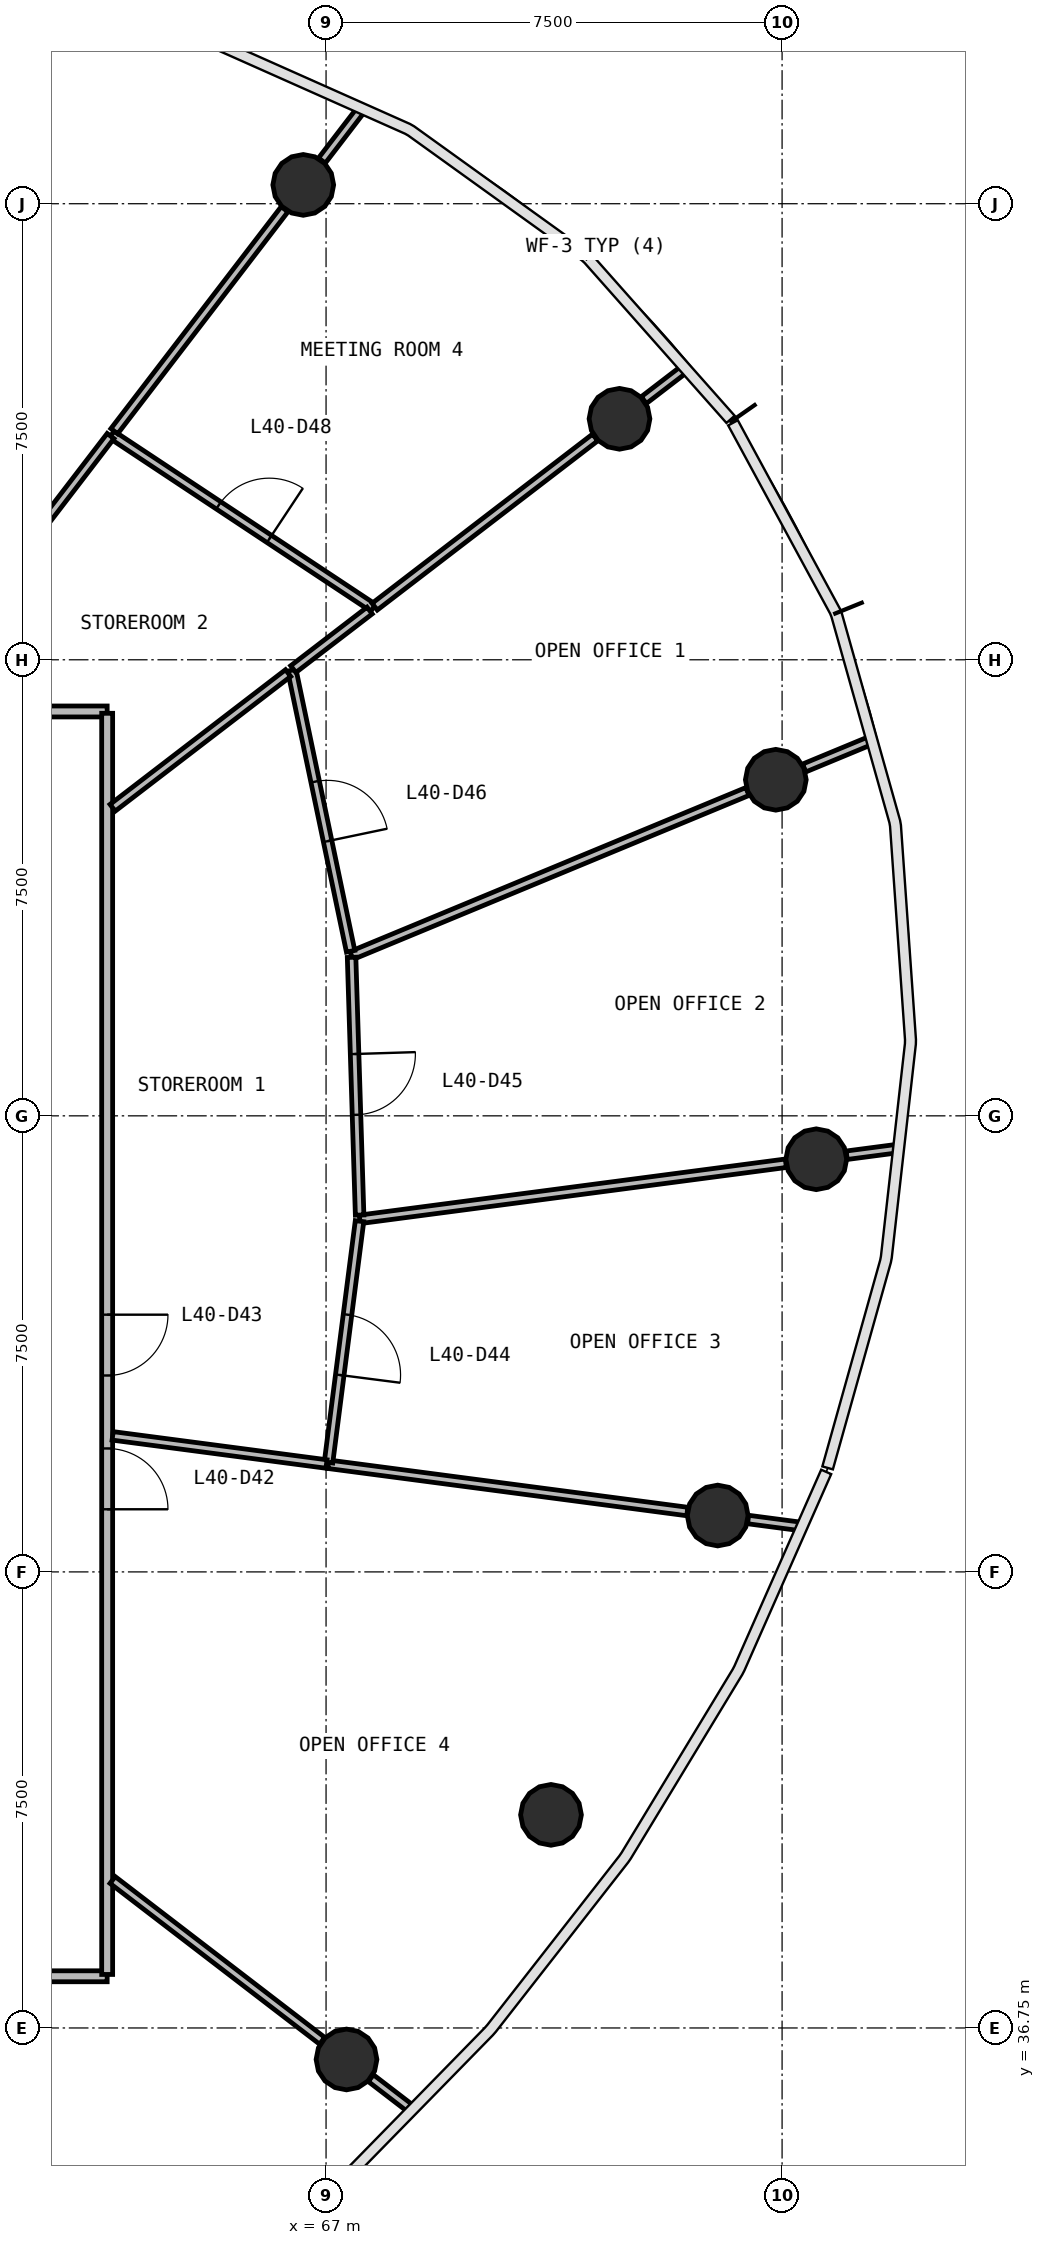
"""IFC4 building model, lengths in metres.
Left out: names, types, materials, properties, quantities, classifications, styles, units other than length and angle.
Written with IfcOpenShell. Run it as: python <this file> out.ifc"""

import sys

from ifc_helpers import new_model, si_unit, direction, frame, frame_2d, origin, origin_2d, place, context, subcontext, project, spatial, rectangle, circle, extrude, source, transform, mapped, element, fill, save


model = new_model("IFC4")
c1 = context("Model", 3, precision=1e-05, world=origin(), true_north=direction((0.0, 1.0)))
c2 = subcontext(c1, "Body", "Model", "MODEL_VIEW")
j1 = project(units=[si_unit("LENGTHUNIT", "METRE"), si_unit("PLANEANGLEUNIT", "RADIAN")], contexts=[c1])
p1 = place(None, origin())
s1 = spatial("IfcSite", under=j1, at=p1, CompositionType="ELEMENT")
p2 = place(p1, origin())
s2 = spatial("IfcBuilding", under=s1, at=p2, CompositionType="ELEMENT")
p3 = place(p2, frame((0.0, 0.0, 168.2)))
s3 = spatial("IfcBuildingStorey", under=s2, at=p3, CompositionType="ELEMENT", Elevation=168.2)
m1 = source(origin(), c2, "Body", "SweptSolid", [
    extrude(circle(Radius=0.5, at=origin_2d()), origin(), (0.0, 0.0, 1.0), 3.9),
])
for number, where, z_axis, x_axis in (
    (1, (75.062, 51.036, 0.0), (0.0, 0.0, 1.0), (1.0, 0.0, 0.0)),
    (2, (74.397, 57.277, 0.0), (0.0, 0.0, 1.0), (1.0, 0.0, 0.0)),
    (3, (71.826, 63.213, 0.0), (0.0, 0.0, 1.0), (1.0, 0.0, 0.0)),
    (4, (66.625, 67.06, 0.0), (0.0, 0.0, 1.0), (1.0, 0.0, 0.0)),
    (5, (67.336, 36.232, 0.0), (0.0, 0.0, 1.0), (1.0, 0.0, 0.0)),
    (6, (70.699, 40.254, 0.0), (0.0, 0.0, 1.0), (1.0, 0.0, 0.0)),
    (7, (73.441, 45.177, 0.0), (0.0, 0.0, 1.0), (1.0, 0.0, 0.0)),
):
    element("IfcColumn", number, at=place(p3, frame(where, z_axis=z_axis, x_axis=x_axis)), inside=s3, PredefinedType="COLUMN", context=c2, shape_type="MappedRepresentation", body=[
        mapped(m1, transform((0.0, 0.0, 0.0), scale=1.0)),
    ])
p4 = place(p3, frame((40.6, 58.4, 0.0), z_axis=(0.0, 0.0, 1.0), x_axis=(1.0, 0.0, 0.0)))
e8 = element("IfcWall", 8, at=p4, inside=s3, PredefinedType="PARTITIONING", context=c2, shape_type="SweptSolid", body=[
    extrude(rectangle(XDim=22.8, YDim=0.18, at=frame_2d((11.4, 0.0))), origin(), (0.0, 0.0, 1.0), 2.88),
])
p5 = place(p4, frame((16.05, 0.0, 0.0)))
e9 = element("IfcOpeningElement", 9, at=p5, cuts=e8, PredefinedType="OPENING", context=c2, shape_type="SweptSolid", body=[
    extrude(rectangle(XDim=0.9, YDim=2.1, at=frame_2d((0.45, 1.05))), frame((0.0, 0.1, 0.0), z_axis=(0.0, -1.0, 0.0), x_axis=(1.0, 0.0, 0.0)), (0.0, 0.0, 1.0), 0.2),
])
p6 = place(p4, frame((13.05, 0.0, 0.0)))
e10 = element("IfcOpeningElement", 10, at=p6, cuts=e8, PredefinedType="OPENING", context=c2, shape_type="SweptSolid", body=[
    extrude(rectangle(XDim=0.9, YDim=2.1, at=frame_2d((0.45, 1.05))), frame((0.0, 0.1, 0.0), z_axis=(0.0, -1.0, 0.0), x_axis=(1.0, 0.0, 0.0)), (0.0, 0.0, 1.0), 0.2),
])
p7 = place(p4, frame((10.95, 0.0, 0.0)))
e11 = element("IfcOpeningElement", 11, at=p7, cuts=e8, PredefinedType="OPENING", context=c2, shape_type="SweptSolid", body=[
    extrude(rectangle(XDim=1.0, YDim=2.1, at=frame_2d((0.5, 1.05))), frame((0.0, 0.1, 0.0), z_axis=(0.0, -1.0, 0.0), x_axis=(1.0, 0.0, 0.0)), (0.0, 0.0, 1.0), 0.2),
])
p8 = place(p4, frame((19.95, 0.0, 0.0)))
e12 = element("IfcOpeningElement", 12, at=p8, cuts=e8, PredefinedType="OPENING", context=c2, shape_type="SweptSolid", body=[
    extrude(rectangle(XDim=1.0, YDim=2.1, at=frame_2d((0.5, 1.05))), frame((0.0, 0.1, 0.0), z_axis=(0.0, -1.0, 0.0), x_axis=(1.0, 0.0, 0.0)), (0.0, 0.0, 1.0), 0.2),
])
p9 = place(p3, frame((63.4, 37.6, 0.0), z_axis=(0.0, 0.0, 1.0), x_axis=(-1.0, 0.0, 0.0)))
e13 = element("IfcWall", 13, at=p9, inside=s3, PredefinedType="PARTITIONING", context=c2, shape_type="SweptSolid", body=[
    extrude(rectangle(XDim=22.8, YDim=0.18, at=frame_2d((11.4, 0.0))), origin(), (0.0, 0.0, 1.0), 2.88),
])
p10 = place(p9, frame((12.95, 0.0, 0.0)))
e14 = element("IfcOpeningElement", 14, at=p10, cuts=e13, PredefinedType="OPENING", context=c2, shape_type="SweptSolid", body=[
    extrude(rectangle(XDim=1.0, YDim=2.1, at=frame_2d((0.5, 1.05))), frame((0.0, 0.1, 0.0), z_axis=(0.0, -1.0, 0.0), x_axis=(1.0, 0.0, 0.0)), (0.0, 0.0, 1.0), 0.2),
])
p11 = place(p9, frame((10.95, 0.0, 0.0)))
e15 = element("IfcOpeningElement", 15, at=p11, cuts=e13, PredefinedType="OPENING", context=c2, shape_type="SweptSolid", body=[
    extrude(rectangle(XDim=1.0, YDim=2.1, at=frame_2d((0.5, 1.05))), frame((0.0, 0.1, 0.0), z_axis=(0.0, -1.0, 0.0), x_axis=(1.0, 0.0, 0.0)), (0.0, 0.0, 1.0), 0.2),
])
p12 = place(p9, frame((5.75, 0.0, 0.0)))
e16 = element("IfcOpeningElement", 16, at=p12, cuts=e13, PredefinedType="OPENING", context=c2, shape_type="SweptSolid", body=[
    extrude(rectangle(XDim=1.0, YDim=2.1, at=frame_2d((0.5, 1.05))), frame((0.0, 0.1, 0.0), z_axis=(0.0, -1.0, 0.0), x_axis=(1.0, 0.0, 0.0)), (0.0, 0.0, 1.0), 0.2),
])
p13 = place(p3, frame((63.4, 58.37, 0.0), z_axis=(0.0, 0.0, 1.0), x_axis=(0.0, -1.0, 0.0)))
e17 = element("IfcWall", 17, at=p13, inside=s3, PredefinedType="PARTITIONING", context=c2, shape_type="SweptSolid", body=[
    extrude(rectangle(XDim=20.74, YDim=0.18, at=frame_2d((10.37, 0.0))), origin(), (0.0, 0.0, 1.0), 2.88),
])
p14 = place(p13, frame((12.09, 0.0, 0.0)))
e18 = element("IfcOpeningElement", 18, at=p14, cuts=e17, PredefinedType="OPENING", context=c2, shape_type="SweptSolid", body=[
    extrude(rectangle(XDim=1.0, YDim=2.1, at=frame_2d((0.5, 1.05))), frame((0.0, 0.1, 0.0), z_axis=(0.0, -1.0, 0.0), x_axis=(1.0, 0.0, 0.0)), (0.0, 0.0, 1.0), 0.2),
])
p15 = place(p13, frame((9.89, 0.0, 0.0)))
e19 = element("IfcOpeningElement", 19, at=p15, cuts=e17, PredefinedType="OPENING", context=c2, shape_type="SweptSolid", body=[
    extrude(rectangle(XDim=1.0, YDim=2.1, at=frame_2d((0.5, 1.05))), frame((0.0, 0.1, 0.0), z_axis=(0.0, -1.0, 0.0), x_axis=(1.0, 0.0, 0.0)), (0.0, 0.0, 1.0), 0.2),
])
p16 = place(p3, frame((67.554, 50.048, 0.0), z_axis=(0.0, 0.0, 1.0), x_axis=(0.99144465259, 0.130527778084, 0.0)))
e20 = element("IfcWall", 20, at=p16, inside=s3, PredefinedType="PARTITIONING", context=c2, shape_type="SweptSolid", body=[
    extrude(rectangle(XDim=7.068, YDim=0.14, at=frame_2d((3.534, 0.0))), origin(), (0.0, 0.0, 1.0), 2.88),
])
p17 = place(p3, frame((67.419, 54.387, 0.0), z_axis=(0.0, 0.0, 1.0), x_axis=(0.923885532531, 0.382668946716, 0.0)))
e21 = element("IfcWall", 21, at=p17, inside=s3, PredefinedType="PARTITIONING", context=c2, shape_type="SweptSolid", body=[
    extrude(rectangle(XDim=7.048, YDim=0.14, at=frame_2d((3.524, 0.0))), origin(), (0.0, 0.0, 1.0), 2.88),
])
p18 = place(p3, frame((67.037, 46.021, 0.0), z_axis=(0.0, 0.0, 1.0), x_axis=(0.991443547419, -0.13053617231, 0.0)))
e22 = element("IfcWall", 22, at=p18, inside=s3, PredefinedType="PARTITIONING", context=c2, shape_type="SweptSolid", body=[
    extrude(rectangle(XDim=5.955, YDim=0.14, at=frame_2d((2.978, 0.0))), origin(), (0.0, 0.0, 1.0), 2.88),
])
p19 = place(p3, frame((63.474, 62.954, 0.0), z_axis=(0.0, 0.0, 1.0), x_axis=(0.833735501744, -0.552164027379, 0.0)))
e23 = element("IfcWall", 23, at=p19, inside=s3, PredefinedType="PARTITIONING", context=c2, shape_type="SweptSolid", body=[
    extrude(rectangle(XDim=5.159, YDim=0.14, at=frame_2d((2.58, 0.0))), origin(), (0.0, 0.0, 1.0), 2.88),
])
p20 = place(p19, frame((2.109, 0.0, 0.0)))
e24 = element("IfcOpeningElement", 24, at=p20, cuts=e23, PredefinedType="OPENING", context=c2, shape_type="SweptSolid", body=[
    extrude(rectangle(XDim=1.0, YDim=2.1, at=frame_2d((0.5, 1.05))), frame((0.0, 0.08, 0.0), z_axis=(0.0, -1.0, 0.0), x_axis=(1.0, 0.0, 0.0)), (0.0, 0.0, 1.0), 0.16),
])
p21 = place(p3, frame((66.437, 59.078, 0.0), z_axis=(0.0, 0.0, 1.0), x_axis=(0.20474910854, -0.978814488324, 0.0)))
e25 = element("IfcWall", 25, at=p21, inside=s3, PredefinedType="PARTITIONING", context=c2, shape_type="SweptSolid", body=[
    extrude(rectangle(XDim=4.722, YDim=0.14, at=frame_2d((2.361, 0.0))), origin(), (0.0, 0.0, 1.0), 2.88),
])
p22 = place(p21, frame((1.872, 0.0, 0.0)))
e26 = element("IfcOpeningElement", 26, at=p22, cuts=e25, PredefinedType="OPENING", context=c2, shape_type="SweptSolid", body=[
    extrude(rectangle(XDim=1.0, YDim=2.1, at=frame_2d((0.5, 1.05))), frame((0.0, 0.08, 0.0), z_axis=(0.0, -1.0, 0.0), x_axis=(1.0, 0.0, 0.0)), (0.0, 0.0, 1.0), 0.16),
])
p23 = place(p3, frame((63.517, 63.009, 0.0), z_axis=(0.0, 0.0, 1.0), x_axis=(0.608776844193, 0.793341511566, 0.0)))
e27 = element("IfcWall", 27, at=p23, inside=s3, PredefinedType="PARTITIONING", context=c2, shape_type="SweptSolid", body=[
    extrude(rectangle(XDim=4.601, YDim=0.14, at=frame_2d((2.3, 0.0))), origin(), (0.0, 0.0, 1.0), 2.88),
])
p24 = place(p3, frame((67.799, 60.123, 0.0), z_axis=(0.0, 0.0, 1.0), x_axis=(0.793350117956, 0.608765628414, 0.0)))
e28 = element("IfcWall", 28, at=p24, inside=s3, PredefinedType="PARTITIONING", context=c2, shape_type="SweptSolid", body=[
    extrude(rectangle(XDim=4.571, YDim=0.14, at=frame_2d((2.286, 0.0))), origin(), (0.0, 0.0, 1.0), 2.88),
])
p25 = place(p3, frame((63.49, 39.183, 0.0), z_axis=(0.0, 0.0, 1.0), x_axis=(0.793348465904, -0.608767781382, 0.0)))
e29 = element("IfcWall", 29, at=p25, inside=s3, PredefinedType="PARTITIONING", context=c2, shape_type="SweptSolid", body=[
    extrude(rectangle(XDim=4.344, YDim=0.14, at=frame_2d((2.172, 0.0))), origin(), (0.0, 0.0, 1.0), 2.88),
])
p26 = place(p3, frame((67.42, 54.357, 0.0), z_axis=(0.0, 0.0, 1.0), x_axis=(0.031204196908, -0.999513030478, 0.0)))
e30 = element("IfcWall", 30, at=p26, inside=s3, PredefinedType="PARTITIONING", context=c2, shape_type="SweptSolid", body=[
    extrude(rectangle(XDim=4.24, YDim=0.14, at=frame_2d((2.12, 0.0))), origin(), (0.0, 0.0, 1.0), 2.88),
])
p27 = place(p26, frame((1.591, 0.0, 0.0)))
e31 = element("IfcOpeningElement", 31, at=p27, cuts=e30, PredefinedType="OPENING", context=c2, shape_type="SweptSolid", body=[
    extrude(rectangle(XDim=1.0, YDim=2.1, at=frame_2d((0.5, 1.05))), frame((0.0, 0.08, 0.0), z_axis=(0.0, -1.0, 0.0), x_axis=(1.0, 0.0, 0.0)), (0.0, 0.0, 1.0), 0.16),
])
p28 = place(p3, frame((67.55, 50.018, 0.0), z_axis=(0.0, 0.0, 1.0), x_axis=(-0.127361365248, -0.991856382065, 0.0)))
e32 = element("IfcWall", 32, at=p28, inside=s3, PredefinedType="PARTITIONING", context=c2, shape_type="SweptSolid", body=[
    extrude(rectangle(XDim=4.0, YDim=0.14, at=frame_2d((2.0, 0.0))), origin(), (0.0, 0.0, 1.0), 2.88),
])
p29 = place(p28, frame((1.551, 0.0, 0.0)))
e33 = element("IfcOpeningElement", 33, at=p29, cuts=e32, PredefinedType="OPENING", context=c2, shape_type="SweptSolid", body=[
    extrude(rectangle(XDim=1.0, YDim=2.1, at=frame_2d((0.5, 1.05))), frame((0.0, 0.08, 0.0), z_axis=(0.0, -1.0, 0.0), x_axis=(1.0, 0.0, 0.0)), (0.0, 0.0, 1.0), 0.16),
])
p30 = place(p3, frame((63.49, 56.817, 0.0), z_axis=(0.0, 0.0, 1.0), x_axis=(0.79334701906, 0.60876966691, 0.0)))
e34 = element("IfcWall", 34, at=p30, inside=s3, PredefinedType="PARTITIONING", context=c2, shape_type="SweptSolid", body=[
    extrude(rectangle(XDim=3.637, YDim=0.14, at=frame_2d((1.819, 0.0))), origin(), (0.0, 0.0, 1.0), 2.88),
])
p31 = place(p3, frame((63.49, 46.487, 0.0), z_axis=(0.0, 0.0, 1.0), x_axis=(0.991450078563, -0.130486557612, 0.0)))
e35 = element("IfcWall", 35, at=p31, inside=s3, PredefinedType="PARTITIONING", context=c2, shape_type="SweptSolid", body=[
    extrude(rectangle(XDim=3.547, YDim=0.14, at=frame_2d((1.774, 0.0))), origin(), (0.0, 0.0, 1.0), 2.88),
])
p32 = place(p3, frame((61.969, 60.992, 0.0), z_axis=(0.0, 0.0, 1.0), x_axis=(0.608807082058, 0.793318307387, 0.0)))
e36 = element("IfcWall", 36, at=p32, inside=s3, PredefinedType="PARTITIONING", context=c2, shape_type="SweptSolid", body=[
    extrude(rectangle(XDim=2.443, YDim=0.14, at=frame_2d((1.221, 0.0))), origin(), (0.0, 0.0, 1.0), 2.88),
])
p33 = place(p3, frame((66.461, 59.096, 0.0), z_axis=(0.0, 0.0, 1.0), x_axis=(0.793380361994, 0.608726212022, 0.0)))
e37 = element("IfcWall", 37, at=p33, inside=s3, PredefinedType="PARTITIONING", context=c2, shape_type="SweptSolid", body=[
    extrude(rectangle(XDim=1.583, YDim=0.14, at=frame_2d((0.791, 0.0))), origin(), (0.0, 0.0, 1.0), 2.88),
])
p34 = place(p3, frame((74.863, 57.47, 0.0), z_axis=(0.0, 0.0, 1.0), x_axis=(0.923891330959, 0.382654947151, 0.0)))
e38 = element("IfcWall", 38, at=p34, inside=s3, PredefinedType="PARTITIONING", context=c2, shape_type="SweptSolid", body=[
    extrude(rectangle(XDim=1.186, YDim=0.14, at=frame_2d((0.593, 0.0))), origin(), (0.0, 0.0, 1.0), 2.88),
])
p35 = place(p3, frame((66.932, 67.46, 0.0), z_axis=(0.0, 0.0, 1.0), x_axis=(0.608863825282, 0.793274758367, 0.0)))
e39 = element("IfcWall", 39, at=p35, inside=s3, PredefinedType="PARTITIONING", context=c2, shape_type="SweptSolid", body=[
    extrude(rectangle(XDim=1.031, YDim=0.14, at=frame_2d((0.516, 0.0))), origin(), (0.0, 0.0, 1.0), 2.88),
])
p36 = place(p3, frame((72.226, 63.52, 0.0), z_axis=(0.0, 0.0, 1.0), x_axis=(0.793315863556, 0.608810266529, 0.0)))
e40 = element("IfcWall", 40, at=p36, inside=s3, PredefinedType="PARTITIONING", context=c2, shape_type="SweptSolid", body=[
    extrude(rectangle(XDim=0.839, YDim=0.14, at=frame_2d((0.419, 0.0))), origin(), (0.0, 0.0, 1.0), 2.88),
])
p37 = place(p3, frame((73.941, 45.111, 0.0), z_axis=(0.0, 0.0, 1.0), x_axis=(0.991457294924, -0.130431715243, 0.0)))
e41 = element("IfcWall", 41, at=p37, inside=s3, PredefinedType="PARTITIONING", context=c2, shape_type="SweptSolid", body=[
    extrude(rectangle(XDim=0.831, YDim=0.14, at=frame_2d((0.416, 0.0))), origin(), (0.0, 0.0, 1.0), 2.88),
])
p38 = place(p3, frame((75.562, 51.102, 0.0), z_axis=(0.0, 0.0, 1.0), x_axis=(0.991448264879, 0.130500337426, 0.0)))
e42 = element("IfcWall", 42, at=p38, inside=s3, PredefinedType="PARTITIONING", context=c2, shape_type="SweptSolid", body=[
    extrude(rectangle(XDim=0.827, YDim=0.14, at=frame_2d((0.414, 0.0))), origin(), (0.0, 0.0, 1.0), 2.88),
])
p39 = place(p3, frame((67.737, 35.925, 0.0), z_axis=(0.0, 0.0, 1.0), x_axis=(0.79338870093, -0.608715343355, 0.0)))
e43 = element("IfcWall", 43, at=p39, inside=s3, PredefinedType="PARTITIONING", context=c2, shape_type="SweptSolid", body=[
    extrude(rectangle(XDim=0.794, YDim=0.14, at=frame_2d((0.397, 0.0))), origin(), (0.0, 0.0, 1.0), 2.88),
])
m2 = source(origin(), c2, "Body", "SweptSolid", [
    extrude(rectangle(XDim=1.0, YDim=2.1, at=frame_2d((0.5, 1.05))), frame((0.0, 0.025, 0.0), z_axis=(0.0, -1.0, 0.0), x_axis=(1.0, 0.0, 0.0)), (0.0, 0.0, 1.0), 0.05),
])
p40 = place(p14, origin())
e44 = element("IfcDoor", 44, at=p40, inside=s3, OperationType="SINGLE_SWING_RIGHT", PredefinedType="DOOR", context=c2, shape_type="MappedRepresentation", body=[
    mapped(m2, transform((0.0, 0.0, 0.0), scale=1.0)),
])
fill(e18, e44)
p41 = place(p15, origin())
e45 = element("IfcDoor", 45, at=p41, inside=s3, OperationType="SINGLE_SWING_LEFT", PredefinedType="DOOR", context=c2, shape_type="MappedRepresentation", body=[
    mapped(m2, transform((0.0, 0.0, 0.0), scale=1.0)),
])
fill(e19, e45)
p42 = place(p29, origin())
e46 = element("IfcDoor", 46, at=p42, inside=s3, OperationType="SINGLE_SWING_RIGHT", PredefinedType="DOOR", context=c2, shape_type="MappedRepresentation", body=[
    mapped(m2, transform((0.0, 0.0, 0.0), scale=1.0)),
])
fill(e33, e46)
p43 = place(p27, origin())
e47 = element("IfcDoor", 47, at=p43, inside=s3, OperationType="SINGLE_SWING_LEFT", PredefinedType="DOOR", context=c2, shape_type="MappedRepresentation", body=[
    mapped(m2, transform((0.0, 0.0, 0.0), scale=1.0)),
])
fill(e31, e47)
p44 = place(p22, origin())
e48 = element("IfcDoor", 48, at=p44, inside=s3, OperationType="SINGLE_SWING_RIGHT", PredefinedType="DOOR", context=c2, shape_type="MappedRepresentation", body=[
    mapped(m2, transform((0.0, 0.0, 0.0), scale=1.0)),
])
fill(e26, e48)
p45 = place(p20, origin())
e49 = element("IfcDoor", 49, at=p45, inside=s3, OperationType="SINGLE_SWING_RIGHT", PredefinedType="DOOR", context=c2, shape_type="MappedRepresentation", body=[
    mapped(m2, transform((0.0, 0.0, 0.0), scale=1.0)),
])
fill(e24, e49)
save(model, sys.argv[1])
